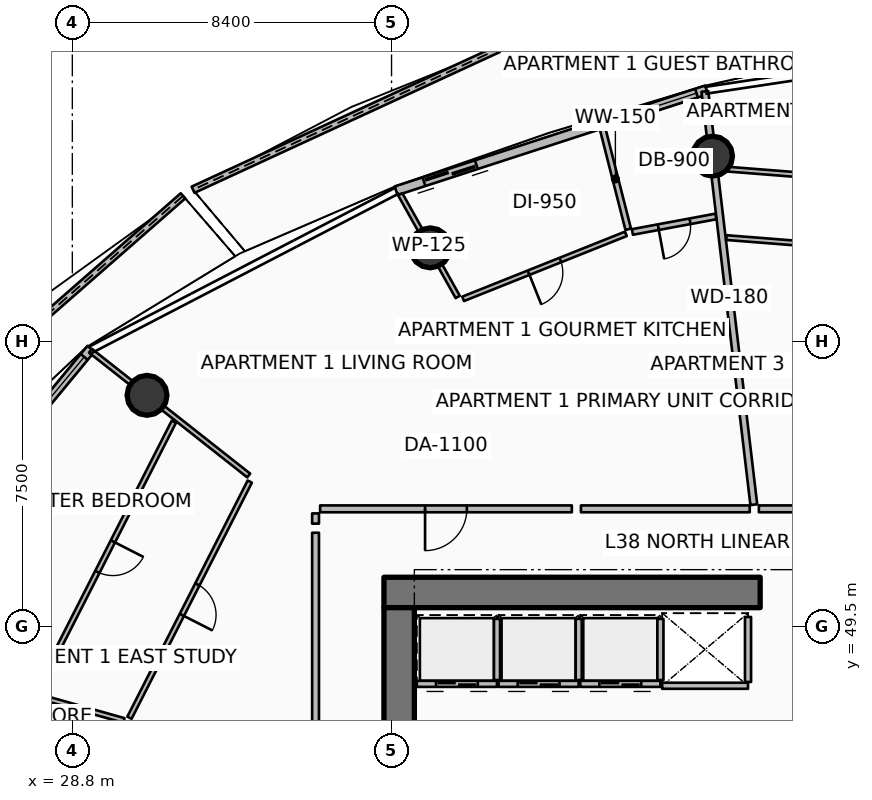
"""IFC4 building model, lengths in metres.
Left out: names, types, materials, properties, quantities, classifications, styles, units other than length and angle.
Written with IfcOpenShell. Run it as: python <this file> out.ifc"""

import sys

from ifc_helpers import new_model, si_unit, direction, frame, frame_2d, origin, origin_2d, place, context, subcontext, project, spatial, polyline, rectangle, circle, outline, extrude, element, fill, save


model = new_model("IFC4")
c1 = context("Model", 3, precision=1e-05, world=origin(), true_north=direction((0.0, 1.0)))
c2 = subcontext(c1, "Body", "Model", "MODEL_VIEW")
j1 = project(units=[si_unit("LENGTHUNIT", "METRE"), si_unit("PLANEANGLEUNIT", "RADIAN")], contexts=[c1])
p1 = place(None, origin())
s1 = spatial("IfcSite", under=j1, at=p1, CompositionType="ELEMENT")
p2 = place(p1, origin())
s2 = spatial("IfcBuilding", under=s1, at=p2, CompositionType="ELEMENT")
p3 = place(p2, frame((0.0, 0.0, 154.05)))
s3 = spatial("IfcBuildingStorey", under=s2, at=p3, CompositionType="ELEMENT", Elevation=154.05)
p4 = place(p3, frame((37.0, 50.4, 0.0), z_axis=(0.0, 0.0, 1.0), x_axis=(1.0, 0.0, 0.0)))
e1 = element("IfcWall", 1, at=p4, inside=s3, PredefinedType="SHEAR", context=c2, shape_type="SweptSolid", body=[
    extrude(rectangle(XDim=9.9, YDim=0.8, at=frame_2d((4.95, 0.0))), origin(), (0.0, 0.0, 1.0), 3.75),
])
p5 = place(p3, frame((37.4, 34.0, 0.0), z_axis=(0.0, 0.0, 1.0), x_axis=(0.0, 1.0, 0.0)))
e2 = element("IfcWall", 2, at=p5, inside=s3, PredefinedType="SHEAR", context=c2, shape_type="SweptSolid", body=[
    extrude(rectangle(XDim=16.0, YDim=0.8, at=frame_2d((8.0, 0.0))), origin(), (0.0, 0.0, 1.0), 3.75),
])
for number, where, z_axis, x_axis in (
    (3, (45.647, 61.881, 0.0), (0.0, 0.0, 1.0), (1.0, 0.0, 0.0)),
    (4, (38.218, 59.467, 0.0), (0.0, 0.0, 1.0), (1.0, 0.0, 0.0)),
    (5, (30.766, 55.586, 0.0), (0.0, 0.0, 1.0), (1.0, 0.0, 0.0)),
):
    element("IfcColumn", number, at=place(p3, frame(where, z_axis=z_axis, x_axis=x_axis)), inside=s3, PredefinedType="COLUMN", context=c2, shape_type="SweptSolid", body=[
        extrude(circle(Radius=0.525, at=origin_2d()), origin(), (0.0, 0.0, 1.0), 3.5),
    ])
p6 = place(p3, frame((40.435, 64.897, 0.0), z_axis=(0.0, 0.0, 1.0), x_axis=(-0.908087442579, -0.418780606799, 0.0)))
e6 = element("IfcWall", 6, at=p6, inside=s3, PredefinedType="PARAPET", context=c2, shape_type="SweptSolid", body=[
    extrude(outline(polyline([(0.0, 0.0), (9.315, 0.0), (9.315, 1.497), (4.658, 1.696), (0.0, 1.832), (0.0, 0.0)])), frame((0.0, 0.09, 0.0), z_axis=(0.0, -1.0, 0.0), x_axis=(1.0, 0.0, 0.0)), (0.0, 0.0, 1.0), 0.18),
])
p7 = place(p3, frame((31.712, 60.836, 0.0), z_axis=(0.0, 0.0, 1.0), x_axis=(-0.752617556845, -0.658457905358, 0.0)))
e7 = element("IfcWall", 7, at=p7, inside=s3, PredefinedType="PARAPET", context=c2, shape_type="SweptSolid", body=[
    extrude(outline(polyline([(0.0, 0.0), (9.993, 0.0), (9.993, 1.148), (4.997, 1.284), (0.0, 1.483), (0.0, 0.0)])), frame((0.0, 0.09, 0.0), z_axis=(0.0, -1.0, 0.0), x_axis=(1.0, 0.0, 0.0)), (0.0, 0.0, 1.0), 0.18),
])
p8 = place(p3, frame((45.49, 63.624, 0.0), z_axis=(0.0, 0.0, 1.0), x_axis=(-0.951046390632, -0.309048156224, 0.0)))
e8 = element("IfcWall", 8, at=p8, inside=s3, PredefinedType="SOLIDWALL", context=c2, shape_type="SweptSolid", body=[
    extrude(rectangle(XDim=8.59, YDim=0.24, at=frame_2d((4.295, 0.0))), origin(), (0.0, 0.0, 1.0), 2.45),
])
p9 = place(p8, frame((6.37, 0.0, 0.0)))
e9 = element("IfcOpeningElement", 9, at=p9, cuts=e8, PredefinedType="OPENING", context=c2, shape_type="SweptSolid", body=[
    extrude(rectangle(XDim=1.45, YDim=2.15, at=frame_2d((0.725, 1.075))), frame((0.0, 0.13, 0.0), z_axis=(0.0, -1.0, 0.0), x_axis=(1.0, 0.0, 0.0)), (0.0, 0.0, 1.0), 0.26),
])
p10 = place(p8, frame((0.28, 0.0, 0.65)))
e10 = element("IfcOpeningElement", 10, at=p10, cuts=e8, PredefinedType="OPENING", context=c2, shape_type="SweptSolid", body=[
    extrude(rectangle(XDim=1.6, YDim=1.5, at=frame_2d((0.8, 0.75))), frame((0.0, 0.13, 0.0), z_axis=(0.0, -1.0, 0.0), x_axis=(1.0, 0.0, 0.0)), (0.0, 0.0, 1.0), 0.26),
])
p11 = place(p3, frame((29.291, 56.813, 0.0), z_axis=(0.0, 0.0, 1.0), x_axis=(-0.636771922292, -0.77105221547, 0.0)))
e11 = element("IfcWall", 11, at=p11, inside=s3, PredefinedType="SOLIDWALL", context=c2, shape_type="SweptSolid", body=[
    extrude(rectangle(XDim=10.082, YDim=0.24, at=frame_2d((5.041, 0.0))), origin(), (0.0, 0.0, 1.0), 2.45),
])
p12 = place(p11, frame((7.862, 0.0, 0.0)))
e12 = element("IfcOpeningElement", 12, at=p12, cuts=e11, PredefinedType="OPENING", context=c2, shape_type="SweptSolid", body=[
    extrude(rectangle(XDim=1.45, YDim=2.15, at=frame_2d((0.725, 1.075))), frame((0.0, 0.13, 0.0), z_axis=(0.0, -1.0, 0.0), x_axis=(1.0, 0.0, 0.0)), (0.0, 0.0, 1.0), 0.26),
])
p13 = place(p11, frame((0.28, 0.0, 0.65)))
e13 = element("IfcOpeningElement", 13, at=p13, cuts=e11, PredefinedType="OPENING", context=c2, shape_type="SweptSolid", body=[
    extrude(rectangle(XDim=1.6, YDim=1.5, at=frame_2d((0.8, 0.75))), frame((0.0, 0.13, 0.0), z_axis=(0.0, -1.0, 0.0), x_axis=(1.0, 0.0, 0.0)), (0.0, 0.0, 1.0), 0.26),
])
p14 = place(p3, frame((39.975, 47.995, 0.0), z_axis=(0.0, 0.0, 1.0), x_axis=(-1.0, 0.0, 0.0)))
e14 = element("IfcWall", 14, at=p14, inside=s3, PredefinedType="PARTITIONING", context=c2, shape_type="SweptSolid", body=[
    extrude(rectangle(XDim=2.11, YDim=0.16, at=frame_2d((1.055, 0.0))), origin(), (0.0, 0.0, 1.0), 3.5),
])
p15 = place(p14, frame((0.505, 0.0, 0.0)))
e15 = element("IfcOpeningElement", 15, at=p15, cuts=e14, PredefinedType="OPENING", context=c2, shape_type="SweptSolid", body=[
    extrude(rectangle(XDim=1.1, YDim=2.1, at=frame_2d((0.55, 1.05))), frame((0.0, 0.09, 0.0), z_axis=(0.0, -1.0, 0.0), x_axis=(1.0, 0.0, 0.0)), (0.0, 0.0, 1.0), 0.18),
])
p16 = place(p3, frame((39.975, 48.095, 0.0), z_axis=(0.0, 0.0, 1.0), x_axis=(0.0, 1.0, 0.0)))
e16 = element("IfcWall", 16, at=p16, inside=s3, PredefinedType="PARTITIONING", context=c2, shape_type="SweptSolid", body=[
    extrude(rectangle(XDim=1.61, YDim=0.16, at=frame_2d((0.805, 0.0))), origin(), (0.0, 0.0, 1.0), 3.5),
])
p17 = place(p3, frame((42.125, 47.995, 0.0), z_axis=(0.0, 0.0, 1.0), x_axis=(-1.0, 0.0, 0.0)))
e17 = element("IfcWall", 17, at=p17, inside=s3, PredefinedType="PARTITIONING", context=c2, shape_type="SweptSolid", body=[
    extrude(rectangle(XDim=2.11, YDim=0.16, at=frame_2d((1.055, 0.0))), origin(), (0.0, 0.0, 1.0), 3.5),
])
p18 = place(p17, frame((0.505, 0.0, 0.0)))
e18 = element("IfcOpeningElement", 18, at=p18, cuts=e17, PredefinedType="OPENING", context=c2, shape_type="SweptSolid", body=[
    extrude(rectangle(XDim=1.1, YDim=2.1, at=frame_2d((0.55, 1.05))), frame((0.0, 0.09, 0.0), z_axis=(0.0, -1.0, 0.0), x_axis=(1.0, 0.0, 0.0)), (0.0, 0.0, 1.0), 0.18),
])
p19 = place(p3, frame((42.125, 48.095, 0.0), z_axis=(0.0, 0.0, 1.0), x_axis=(0.0, 1.0, 0.0)))
e19 = element("IfcWall", 19, at=p19, inside=s3, PredefinedType="PARTITIONING", context=c2, shape_type="SweptSolid", body=[
    extrude(rectangle(XDim=1.61, YDim=0.16, at=frame_2d((0.805, 0.0))), origin(), (0.0, 0.0, 1.0), 3.5),
])
p20 = place(p3, frame((44.275, 47.995, 0.0), z_axis=(0.0, 0.0, 1.0), x_axis=(-1.0, 0.0, 0.0)))
e20 = element("IfcWall", 20, at=p20, inside=s3, PredefinedType="PARTITIONING", context=c2, shape_type="SweptSolid", body=[
    extrude(rectangle(XDim=2.11, YDim=0.16, at=frame_2d((1.055, 0.0))), origin(), (0.0, 0.0, 1.0), 3.5),
])
p21 = place(p20, frame((0.505, 0.0, 0.0)))
e21 = element("IfcOpeningElement", 21, at=p21, cuts=e20, PredefinedType="OPENING", context=c2, shape_type="SweptSolid", body=[
    extrude(rectangle(XDim=1.1, YDim=2.1, at=frame_2d((0.55, 1.05))), frame((0.0, 0.09, 0.0), z_axis=(0.0, -1.0, 0.0), x_axis=(1.0, 0.0, 0.0)), (0.0, 0.0, 1.0), 0.18),
])
p22 = place(p3, frame((44.275, 48.095, 0.0), z_axis=(0.0, 0.0, 1.0), x_axis=(0.0, 1.0, 0.0)))
e22 = element("IfcWall", 22, at=p22, inside=s3, PredefinedType="PARTITIONING", context=c2, shape_type="SweptSolid", body=[
    extrude(rectangle(XDim=1.61, YDim=0.16, at=frame_2d((0.805, 0.0))), origin(), (0.0, 0.0, 1.0), 3.5),
])
p23 = place(p3, frame((46.58, 47.945, 0.0), z_axis=(0.0, 0.0, 1.0), x_axis=(-1.0, 0.0, 0.0)))
e23 = element("IfcWall", 23, at=p23, inside=s3, PredefinedType="PARTITIONING", context=c2, shape_type="SweptSolid", body=[
    extrude(rectangle(XDim=2.26, YDim=0.16, at=frame_2d((1.13, 0.0))), origin(), (0.0, 0.0, 1.0), 3.5),
])
p24 = place(p3, frame((46.58, 48.045, 0.0), z_axis=(0.0, 0.0, 1.0), x_axis=(0.0, 1.0, 0.0)))
e24 = element("IfcWall", 24, at=p24, inside=s3, PredefinedType="PARTITIONING", context=c2, shape_type="SweptSolid", body=[
    extrude(rectangle(XDim=1.71, YDim=0.16, at=frame_2d((0.855, 0.0))), origin(), (0.0, 0.0, 1.0), 3.5),
])
p25 = place(p3, frame((46.732, 52.709, 0.0), z_axis=(0.0, 0.0, 1.0), x_axis=(-0.117537145285, 0.993068486802, 0.0)))
e25 = element("IfcWall", 25, at=p25, inside=s3, PredefinedType="PARTITIONING", context=c2, shape_type="SweptSolid", body=[
    extrude(rectangle(XDim=10.951, YDim=0.18, at=frame_2d((5.475, 0.0))), origin(), (0.0, 0.0, 1.0), 2.94),
])
p26 = place(p3, frame((41.944, 52.6, 0.0), z_axis=(0.0, 0.0, 1.0), x_axis=(-1.0, 0.0, 0.0)))
e26 = element("IfcWall", 26, at=p26, inside=s3, PredefinedType="PARTITIONING", context=c2, shape_type="SweptSolid", body=[
    extrude(rectangle(XDim=6.624, YDim=0.18, at=frame_2d((3.312, 0.0))), origin(), (0.0, 0.0, 1.0), 2.94),
])
p27 = place(p26, frame((2.762, 0.0, 0.0)))
e27 = element("IfcOpeningElement", 27, at=p27, cuts=e26, PredefinedType="OPENING", context=c2, shape_type="SweptSolid", body=[
    extrude(rectangle(XDim=1.1, YDim=2.1, at=frame_2d((0.55, 1.05))), frame((0.0, 0.1, 0.0), z_axis=(0.0, -1.0, 0.0), x_axis=(1.0, 0.0, 0.0)), (0.0, 0.0, 1.0), 0.2),
])
p28 = place(p3, frame((35.2, 52.48, 0.0), z_axis=(0.0, 0.0, 1.0), x_axis=(0.0, -1.0, 0.0)))
e28 = element("IfcWall", 28, at=p28, inside=s3, PredefinedType="PARTITIONING", context=c2, shape_type="SweptSolid", body=[
    extrude(rectangle(XDim=0.269, YDim=0.18, at=frame_2d((0.135, 0.0))), origin(), (0.0, 0.0, 1.0), 2.94),
])
p29 = place(p3, frame((46.625, 52.6, 0.0), z_axis=(0.0, 0.0, 1.0), x_axis=(-1.0, 0.0, 0.0)))
e29 = element("IfcWall", 29, at=p29, inside=s3, PredefinedType="PARTITIONING", context=c2, shape_type="SweptSolid", body=[
    extrude(rectangle(XDim=4.442, YDim=0.18, at=frame_2d((2.221, 0.0))), origin(), (0.0, 0.0, 1.0), 2.94),
])
p30 = place(p3, frame((38.941, 58.175, 0.0), z_axis=(0.0, 0.0, 1.0), x_axis=(-0.488620181058, 0.872496600946, 0.0)))
e30 = element("IfcWall", 30, at=p30, inside=s3, PredefinedType="PARTITIONING", context=c2, shape_type="SweptSolid", body=[
    extrude(rectangle(XDim=3.095, YDim=0.125, at=frame_2d((1.548, 0.0))), origin(), (0.0, 0.0, 1.0), 2.94),
])
p31 = place(p3, frame((45.734, 60.293, 0.0), z_axis=(0.0, 0.0, 1.0), x_axis=(-0.983182569162, -0.182625397184, 0.0)))
e31 = element("IfcWall", 31, at=p31, inside=s3, PredefinedType="PARTITIONING", context=c2, shape_type="SweptSolid", body=[
    extrude(rectangle(XDim=2.234, YDim=0.15, at=frame_2d((1.117, 0.0))), origin(), (0.0, 0.0, 1.0), 2.94),
])
p32 = place(p31, frame((0.692, 0.0, 0.0)))
e32 = element("IfcOpeningElement", 32, at=p32, cuts=e31, PredefinedType="OPENING", context=c2, shape_type="SweptSolid", body=[
    extrude(rectangle(XDim=0.85, YDim=2.06, at=frame_2d((0.425, 1.03))), frame((0.0, 0.085, 0.0), z_axis=(0.0, -1.0, 0.0), x_axis=(1.0, 0.0, 0.0)), (0.0, 0.0, 1.0), 0.17),
])
p33 = place(p3, frame((43.427, 59.956, 0.0), z_axis=(0.0, 0.0, 1.0), x_axis=(-0.246779972966, 0.969071537578, 0.0)))
e33 = element("IfcWall", 33, at=p33, inside=s3, PredefinedType="PARTITIONING", context=c2, shape_type="SweptSolid", body=[
    extrude(rectangle(XDim=2.732, YDim=0.15, at=frame_2d((1.366, 0.0))), origin(), (0.0, 0.0, 1.0), 2.94),
])
p34 = place(p3, frame((43.366, 59.835, 0.0), z_axis=(0.0, 0.0, 1.0), x_axis=(-0.928691950022, -0.370852075584, 0.0)))
e34 = element("IfcWall", 34, at=p34, inside=s3, PredefinedType="PARTITIONING", context=c2, shape_type="SweptSolid", body=[
    extrude(rectangle(XDim=4.612, YDim=0.125, at=frame_2d((2.306, 0.0))), origin(), (0.0, 0.0, 1.0), 2.94),
])
p35 = place(p34, frame((1.856, 0.0, 0.0)))
e35 = element("IfcOpeningElement", 35, at=p35, cuts=e34, PredefinedType="OPENING", context=c2, shape_type="SweptSolid", body=[
    extrude(rectangle(XDim=0.9, YDim=2.08, at=frame_2d((0.45, 1.04))), frame((0.0, 0.073, 0.0), z_axis=(0.0, -1.0, 0.0), x_axis=(1.0, 0.0, 0.0)), (0.0, 0.0, 1.0), 0.145),
])
p36 = place(p3, frame((35.2, 51.971, 0.0), z_axis=(0.0, 0.0, 1.0), x_axis=(0.0, -1.0, 0.0)))
e36 = element("IfcWall", 36, at=p36, inside=s3, PredefinedType="PARTITIONING", context=c2, shape_type="SweptSolid", body=[
    extrude(rectangle(XDim=6.241, YDim=0.18, at=frame_2d((3.12, 0.0))), origin(), (0.0, 0.0, 1.0), 2.94),
])
p37 = place(p3, frame((33.441, 53.477, 0.0), z_axis=(0.0, 0.0, 1.0), x_axis=(-0.785319981095, 0.619090080112, 0.0)))
e37 = element("IfcWall", 37, at=p37, inside=s3, PredefinedType="PARTITIONING", context=c2, shape_type="SweptSolid", body=[
    extrude(rectangle(XDim=5.301, YDim=0.125, at=frame_2d((2.65, 0.0))), origin(), (0.0, 0.0, 1.0), 2.94),
])
p38 = place(p3, frame((33.469, 53.317, 0.0), z_axis=(0.0, 0.0, 1.0), x_axis=(-0.453977694262, -0.891013048789, 0.0)))
e38 = element("IfcWall", 38, at=p38, inside=s3, PredefinedType="PARTITIONING", context=c2, shape_type="SweptSolid", body=[
    extrude(rectangle(XDim=6.974, YDim=0.125, at=frame_2d((3.487, 0.0))), origin(), (0.0, 0.0, 1.0), 2.94),
])
p39 = place(p38, frame((3.037, 0.0, 0.0)))
e39 = element("IfcOpeningElement", 39, at=p39, cuts=e38, PredefinedType="OPENING", context=c2, shape_type="SweptSolid", body=[
    extrude(rectangle(XDim=0.9, YDim=2.08, at=frame_2d((0.45, 1.04))), frame((0.0, 0.073, 0.0), z_axis=(0.0, -1.0, 0.0), x_axis=(1.0, 0.0, 0.0)), (0.0, 0.0, 1.0), 0.145),
])
p40 = place(p3, frame((31.472, 54.892, 0.0), z_axis=(0.0, 0.0, 1.0), x_axis=(-0.453991424948, -0.89100605277, 0.0)))
e40 = element("IfcWall", 40, at=p40, inside=s3, PredefinedType="PARTITIONING", context=c2, shape_type="SweptSolid", body=[
    extrude(rectangle(XDim=7.967, YDim=0.125, at=frame_2d((3.983, 0.0))), origin(), (0.0, 0.0, 1.0), 2.94),
])
p41 = place(p40, frame((3.534, 0.0, 0.0)))
e41 = element("IfcOpeningElement", 41, at=p41, cuts=e40, PredefinedType="OPENING", context=c2, shape_type="SweptSolid", body=[
    extrude(rectangle(XDim=0.9, YDim=2.08, at=frame_2d((0.45, 1.04))), frame((0.0, 0.073, 0.0), z_axis=(0.0, -1.0, 0.0), x_axis=(1.0, 0.0, 0.0)), (0.0, 0.0, 1.0), 0.145),
])
p42 = place(p3, frame((30.157, 47.032, 0.0), z_axis=(0.0, 0.0, 1.0), x_axis=(-0.962456736489, 0.271435131084, 0.0)))
e42 = element("IfcWall", 42, at=p42, inside=s3, PredefinedType="PARTITIONING", context=c2, shape_type="SweptSolid", body=[
    extrude(rectangle(XDim=7.412, YDim=0.125, at=frame_2d((3.706, 0.0))), origin(), (0.0, 0.0, 1.0), 2.94),
])
p43 = place(p3, frame((50.869, 52.6, 0.0), z_axis=(0.0, 0.0, 1.0), x_axis=(-1.0, 0.0, 0.0)))
e43 = element("IfcWall", 43, at=p43, inside=s3, PredefinedType="PARTITIONING", context=c2, shape_type="SweptSolid", body=[
    extrude(rectangle(XDim=4.004, YDim=0.18, at=frame_2d((2.002, 0.0))), origin(), (0.0, 0.0, 1.0), 2.94),
])
p44 = place(p3, frame((52.741, 59.208, 0.0), z_axis=(0.0, 0.0, 1.0), x_axis=(-0.996917452966, 0.078457580711, 0.0)))
e44 = element("IfcWall", 44, at=p44, inside=s3, PredefinedType="PARTITIONING", context=c2, shape_type="SweptSolid", body=[
    extrude(rectangle(XDim=6.752, YDim=0.125, at=frame_2d((3.376, 0.0))), origin(), (0.0, 0.0, 1.0), 2.94),
])
p45 = place(p44, frame((2.926, 0.0, 0.0)))
e45 = element("IfcOpeningElement", 45, at=p45, cuts=e44, PredefinedType="OPENING", context=c2, shape_type="SweptSolid", body=[
    extrude(rectangle(XDim=0.9, YDim=2.08, at=frame_2d((0.45, 1.04))), frame((0.0, 0.073, 0.0), z_axis=(0.0, -1.0, 0.0), x_axis=(1.0, 0.0, 0.0)), (0.0, 0.0, 1.0), 0.145),
])
p46 = place(p3, frame((53.239, 60.972, 0.0), z_axis=(0.0, 0.0, 1.0), x_axis=(-0.996916953075, 0.078463932292, 0.0)))
e46 = element("IfcWall", 46, at=p46, inside=s3, PredefinedType="PARTITIONING", context=c2, shape_type="SweptSolid", body=[
    extrude(rectangle(XDim=7.468, YDim=0.125, at=frame_2d((3.734, 0.0))), origin(), (0.0, 0.0, 1.0), 2.94),
])
p47 = place(p46, frame((3.284, 0.0, 0.0)))
e47 = element("IfcOpeningElement", 47, at=p47, cuts=e46, PredefinedType="OPENING", context=c2, shape_type="SweptSolid", body=[
    extrude(rectangle(XDim=0.9, YDim=2.08, at=frame_2d((0.45, 1.04))), frame((0.0, 0.073, 0.0), z_axis=(0.0, -1.0, 0.0), x_axis=(1.0, 0.0, 0.0)), (0.0, 0.0, 1.0), 0.145),
])
p48 = place(p9, origin())
e48 = element("IfcDoor", 48, at=p48, inside=s3, OperationType="DOUBLE_DOOR_SLIDING", PredefinedType="DOOR", context=c2, shape_type="SweptSolid", body=[
    extrude(rectangle(XDim=1.45, YDim=2.15, at=frame_2d((0.725, 1.075))), frame((0.0, 0.025, 0.0), z_axis=(0.0, -1.0, 0.0), x_axis=(1.0, 0.0, 0.0)), (0.0, 0.0, 1.0), 0.05),
])
fill(e9, e48)
p49 = place(p10, origin())
e49 = element("IfcWindow", 49, at=p49, inside=s3, PartitioningType="SINGLE_PANEL", PredefinedType="WINDOW", context=c2, shape_type="SweptSolid", body=[
    extrude(rectangle(XDim=1.6, YDim=1.5, at=frame_2d((0.8, 0.75))), frame((0.0, 0.03, 0.0), z_axis=(0.0, -1.0, 0.0), x_axis=(1.0, 0.0, 0.0)), (0.0, 0.0, 1.0), 0.06),
])
fill(e10, e49)
p50 = place(p13, origin())
e50 = element("IfcWindow", 50, at=p50, inside=s3, PartitioningType="SINGLE_PANEL", PredefinedType="WINDOW", context=c2, shape_type="SweptSolid", body=[
    extrude(rectangle(XDim=1.6, YDim=1.5, at=frame_2d((0.8, 0.75))), frame((0.0, 0.03, 0.0), z_axis=(0.0, -1.0, 0.0), x_axis=(1.0, 0.0, 0.0)), (0.0, 0.0, 1.0), 0.06),
])
fill(e13, e50)
p51 = place(p15, origin())
e51 = element("IfcDoor", 51, at=p51, inside=s3, OperationType="DOUBLE_DOOR_SLIDING", PredefinedType="DOOR", context=c2, shape_type="SweptSolid", body=[
    extrude(rectangle(XDim=1.1, YDim=2.1, at=frame_2d((0.55, 1.05))), frame((0.0, 0.025, 0.0), z_axis=(0.0, -1.0, 0.0), x_axis=(1.0, 0.0, 0.0)), (0.0, 0.0, 1.0), 0.05),
])
fill(e15, e51)
p52 = place(p18, origin())
e52 = element("IfcDoor", 52, at=p52, inside=s3, OperationType="DOUBLE_DOOR_SLIDING", PredefinedType="DOOR", context=c2, shape_type="SweptSolid", body=[
    extrude(rectangle(XDim=1.1, YDim=2.1, at=frame_2d((0.55, 1.05))), frame((0.0, 0.025, 0.0), z_axis=(0.0, -1.0, 0.0), x_axis=(1.0, 0.0, 0.0)), (0.0, 0.0, 1.0), 0.05),
])
fill(e18, e52)
p53 = place(p21, origin())
e53 = element("IfcDoor", 53, at=p53, inside=s3, OperationType="DOUBLE_DOOR_SLIDING", PredefinedType="DOOR", context=c2, shape_type="SweptSolid", body=[
    extrude(rectangle(XDim=1.1, YDim=2.1, at=frame_2d((0.55, 1.05))), frame((0.0, 0.025, 0.0), z_axis=(0.0, -1.0, 0.0), x_axis=(1.0, 0.0, 0.0)), (0.0, 0.0, 1.0), 0.05),
])
fill(e21, e53)
p54 = place(p27, origin())
e54 = element("IfcDoor", 54, at=p54, inside=s3, OperationType="SINGLE_SWING_RIGHT", PredefinedType="DOOR", context=c2, shape_type="SweptSolid", body=[
    extrude(rectangle(XDim=1.1, YDim=2.1, at=frame_2d((0.55, 1.05))), frame((0.0, 0.025, 0.0), z_axis=(0.0, -1.0, 0.0), x_axis=(1.0, 0.0, 0.0)), (0.0, 0.0, 1.0), 0.05),
])
fill(e27, e54)
p55 = place(p32, origin())
e55 = element("IfcDoor", 55, at=p55, inside=s3, OperationType="SINGLE_SWING_RIGHT", PredefinedType="DOOR", context=c2, shape_type="SweptSolid", body=[
    extrude(rectangle(XDim=0.85, YDim=2.06, at=frame_2d((0.425, 1.03))), frame((0.0, 0.025, 0.0), z_axis=(0.0, -1.0, 0.0), x_axis=(1.0, 0.0, 0.0)), (0.0, 0.0, 1.0), 0.05),
])
fill(e32, e55)
p56 = place(p35, origin())
e56 = element("IfcDoor", 56, at=p56, inside=s3, OperationType="SINGLE_SWING_RIGHT", PredefinedType="DOOR", context=c2, shape_type="SweptSolid", body=[
    extrude(rectangle(XDim=0.9, YDim=2.08, at=frame_2d((0.45, 1.04))), frame((0.0, 0.025, 0.0), z_axis=(0.0, -1.0, 0.0), x_axis=(1.0, 0.0, 0.0)), (0.0, 0.0, 1.0), 0.05),
])
fill(e35, e56)
p57 = place(p39, origin())
e57 = element("IfcDoor", 57, at=p57, inside=s3, OperationType="SINGLE_SWING_RIGHT", PredefinedType="DOOR", context=c2, shape_type="SweptSolid", body=[
    extrude(rectangle(XDim=0.9, YDim=2.08, at=frame_2d((0.45, 1.04))), frame((0.0, 0.025, 0.0), z_axis=(0.0, -1.0, 0.0), x_axis=(1.0, 0.0, 0.0)), (0.0, 0.0, 1.0), 0.05),
])
fill(e39, e57)
p58 = place(p41, origin())
e58 = element("IfcDoor", 58, at=p58, inside=s3, OperationType="SINGLE_SWING_LEFT", PredefinedType="DOOR", context=c2, shape_type="SweptSolid", body=[
    extrude(rectangle(XDim=0.9, YDim=2.08, at=frame_2d((0.45, 1.04))), frame((0.0, 0.025, 0.0), z_axis=(0.0, -1.0, 0.0), x_axis=(1.0, 0.0, 0.0)), (0.0, 0.0, 1.0), 0.05),
])
fill(e41, e58)
save(model, sys.argv[1])
